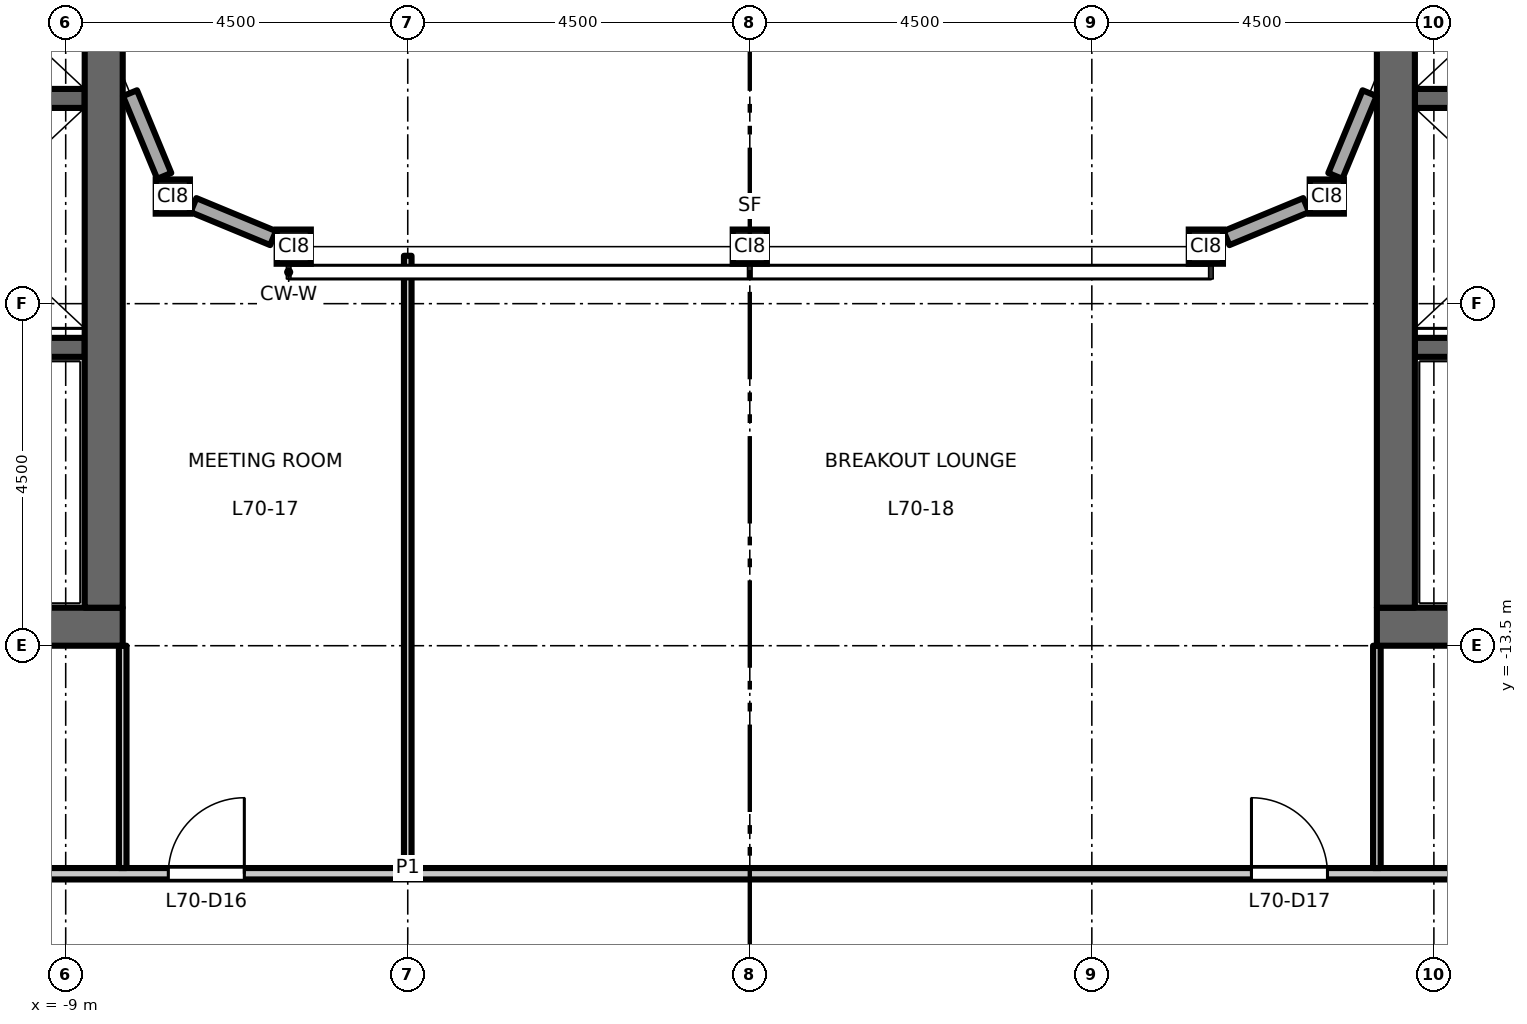
"""IFC4 building model, lengths in metres.
Left out: names, types, materials, properties, quantities, classifications, styles, units other than length and angle.
Written with IfcOpenShell. Run it as: python <this file> out.ifc"""

import sys

from ifc_helpers import new_model, si_unit, direction, frame, frame_2d, origin, origin_2d, place, context, subcontext, project, spatial, rectangle, hollow_rectangle, extrude, element, fill, save


model = new_model("IFC4")
c1 = context("Model", 3, precision=1e-05, world=origin(), true_north=direction((0.0, 1.0)))
c2 = subcontext(c1, "Body", "Model", "MODEL_VIEW")
j1 = project(units=[si_unit("LENGTHUNIT", "METRE"), si_unit("PLANEANGLEUNIT", "RADIAN")], contexts=[c1])
p1 = place(None, origin())
s1 = spatial("IfcSite", under=j1, at=p1, CompositionType="ELEMENT")
p2 = place(p1, origin())
s2 = spatial("IfcBuilding", under=s1, at=p2, CompositionType="ELEMENT")
p3 = place(p2, frame((0.0, 0.0, 325.7)))
s3 = spatial("IfcBuildingStorey", under=s2, at=p3, CompositionType="ELEMENT", Elevation=325.7)
for number, where, z_axis, x_axis in (
    (1, (-7.591, -7.591, 0.0), (0.0, 0.0, 1.0), (1.0, 0.0, 0.0)),
    (2, (-6.0, -8.25, 0.0), (0.0, 0.0, 1.0), (1.0, 0.0, 0.0)),
    (3, (0.0, -8.25, 0.0), (0.0, 0.0, 1.0), (1.0, 0.0, 0.0)),
    (4, (6.0, -8.25, 0.0), (0.0, 0.0, 1.0), (1.0, 0.0, 0.0)),
    (5, (7.591, -7.591, 0.0), (0.0, 0.0, 1.0), (1.0, 0.0, 0.0)),
):
    element("IfcColumn", number, at=place(p3, frame(where, z_axis=z_axis, x_axis=x_axis)), inside=s3, PredefinedType="COLUMN", context=c2, shape_type="SweptSolid", body=[
        extrude(hollow_rectangle(XDim=0.45, YDim=0.45, WallThickness=0.022, at=origin_2d()), origin(), (0.0, 0.0, 1.0), 4.5),
    ])
p4 = place(p3, frame((-8.75, -6.3, 0.0), z_axis=(0.0, 0.0, 1.0), x_axis=(-1.0, 0.0, 0.0)))
e6 = element("IfcWall", 6, at=p4, inside=s3, PredefinedType="SHEAR", context=c2, shape_type="SweptSolid", body=[
    extrude(rectangle(XDim=3.1, YDim=0.25, at=frame_2d((1.55, 0.0))), origin(), (0.0, 0.0, 1.0), 4.35),
])
p5 = place(p3, frame((-8.75, -9.575, 0.0), z_axis=(0.0, 0.0, 1.0), x_axis=(-1.0, 0.0, 0.0)))
e7 = element("IfcWall", 7, at=p5, inside=s3, PredefinedType="SHEAR", context=c2, shape_type="SweptSolid", body=[
    extrude(rectangle(XDim=8.0, YDim=0.25, at=frame_2d((4.0, 0.0))), origin(), (0.0, 0.0, 1.0), 4.35),
])
p6 = place(p5, frame((6.65, 0.0, 0.0)))
e8 = element("IfcOpeningElement", 8, at=p6, cuts=e7, PredefinedType="OPENING", context=c2, shape_type="SweptSolid", body=[
    extrude(rectangle(XDim=1.1, YDim=2.1, at=frame_2d((0.55, 1.05))), frame((0.0, 0.135, 0.0), z_axis=(0.0, -1.0, 0.0), x_axis=(1.0, 0.0, 0.0)), (0.0, 0.0, 1.0), 0.27),
])
p7 = place(p3, frame((-8.25, -13.25, 0.0), z_axis=(0.0, 0.0, 1.0), x_axis=(-1.0, 0.0, 0.0)))
e9 = element("IfcWall", 9, at=p7, inside=s3, PredefinedType="SHEAR", context=c2, shape_type="SweptSolid", body=[
    extrude(rectangle(XDim=9.0, YDim=0.5, at=frame_2d((4.5, 0.0))), origin(), (0.0, 0.0, 1.0), 4.35),
])
p8 = place(p3, frame((-8.5, -13.0, 0.0), z_axis=(0.0, 0.0, 1.0), x_axis=(0.0, 1.0, 0.0)))
e10 = element("IfcWall", 10, at=p8, inside=s3, PredefinedType="SHEAR", context=c2, shape_type="SweptSolid", body=[
    extrude(rectangle(XDim=26.0, YDim=0.5, at=frame_2d((13.0, 0.0))), origin(), (0.0, 0.0, 1.0), 4.35),
])
p9 = place(p3, frame((8.75, -6.3, 0.0), z_axis=(0.0, 0.0, 1.0), x_axis=(1.0, 0.0, 0.0)))
e11 = element("IfcWall", 11, at=p9, inside=s3, PredefinedType="SHEAR", context=c2, shape_type="SweptSolid", body=[
    extrude(rectangle(XDim=3.1, YDim=0.25, at=frame_2d((1.55, 0.0))), origin(), (0.0, 0.0, 1.0), 4.35),
])
p10 = place(p3, frame((8.75, -9.575, 0.0), z_axis=(0.0, 0.0, 1.0), x_axis=(1.0, 0.0, 0.0)))
e12 = element("IfcWall", 12, at=p10, inside=s3, PredefinedType="SHEAR", context=c2, shape_type="SweptSolid", body=[
    extrude(rectangle(XDim=8.0, YDim=0.25, at=frame_2d((4.0, 0.0))), origin(), (0.0, 0.0, 1.0), 4.35),
])
p11 = place(p10, frame((6.65, 0.0, 0.0)))
e13 = element("IfcOpeningElement", 13, at=p11, cuts=e12, PredefinedType="OPENING", context=c2, shape_type="SweptSolid", body=[
    extrude(rectangle(XDim=1.1, YDim=2.1, at=frame_2d((0.55, 1.05))), frame((0.0, 0.135, 0.0), z_axis=(0.0, -1.0, 0.0), x_axis=(1.0, 0.0, 0.0)), (0.0, 0.0, 1.0), 0.27),
])
p12 = place(p3, frame((8.25, -13.25, 0.0), z_axis=(0.0, 0.0, 1.0), x_axis=(1.0, 0.0, 0.0)))
e14 = element("IfcWall", 14, at=p12, inside=s3, PredefinedType="SHEAR", context=c2, shape_type="SweptSolid", body=[
    extrude(rectangle(XDim=9.0, YDim=0.5, at=frame_2d((4.5, 0.0))), origin(), (0.0, 0.0, 1.0), 4.35),
])
p13 = place(p3, frame((8.5, -13.0, 0.0), z_axis=(0.0, 0.0, 1.0), x_axis=(0.0, 1.0, 0.0)))
e15 = element("IfcWall", 15, at=p13, inside=s3, PredefinedType="SHEAR", context=c2, shape_type="SweptSolid", body=[
    extrude(rectangle(XDim=26.0, YDim=0.5, at=frame_2d((13.0, 0.0))), origin(), (0.0, 0.0, 1.0), 4.35),
])
p14 = place(p3, frame((6.271, -8.137, 0.0), z_axis=(0.0, 0.0, 1.0), x_axis=(0.923864661962, 0.382719331074, 0.0)))
e16 = element("IfcWall", 16, at=p14, inside=s3, PredefinedType="STANDARD", context=c2, shape_type="SweptSolid", body=[
    extrude(rectangle(XDim=1.134, YDim=0.2, at=frame_2d((0.567, 0.0))), origin(), (0.0, 0.0, 1.0), 4.01),
])
for number, where, z_axis, x_axis in (
    (17, (7.703, -7.319, 0.0), (0.0, 0.0, 1.0), (0.383, 0.924, 0.0)),
    (18, (-8.154, -6.231, 0.0), (0.0, 0.0, 1.0), (0.383, -0.924, 0.0)),
):
    element("IfcWall", number, at=place(p3, frame(where, z_axis=z_axis, x_axis=x_axis)), inside=s3, PredefinedType="STANDARD", context=c2, shape_type="SweptSolid", body=[
        extrude(rectangle(XDim=1.178, YDim=0.2, at=frame_2d((0.589, 0.0))), origin(), (0.0, 0.0, 1.0), 4.01),
    ])
p15 = place(p3, frame((-7.319, -7.703, 0.0), z_axis=(0.0, 0.0, 1.0), x_axis=(0.923864661962, -0.382719331074, 0.0)))
e19 = element("IfcWall", 19, at=p15, inside=s3, PredefinedType="STANDARD", context=c2, shape_type="SweptSolid", body=[
    extrude(rectangle(XDim=1.134, YDim=0.2, at=frame_2d((0.567, 0.0))), origin(), (0.0, 0.0, 1.0), 4.01),
])
p16 = place(p3, frame((-17.325, -16.5, 0.0), z_axis=(0.0, 0.0, 1.0), x_axis=(1.0, 0.0, 0.0)))
e20 = element("IfcWall", 20, at=p16, inside=s3, PredefinedType="PARTITIONING", context=c2, shape_type="SweptSolid", body=[
    extrude(rectangle(XDim=34.65, YDim=0.15, at=frame_2d((17.325, 0.0))), origin(), (0.0, 0.0, 1.0), 4.35),
])
p17 = place(p16, frame((9.675, 0.0, 0.0)))
e21 = element("IfcOpeningElement", 21, at=p17, cuts=e20, PredefinedType="OPENING", context=c2, shape_type="SweptSolid", body=[
    extrude(rectangle(XDim=1.0, YDim=2.1, at=frame_2d((0.5, 1.05))), frame((0.0, 0.085, 0.0), z_axis=(0.0, -1.0, 0.0), x_axis=(1.0, 0.0, 0.0)), (0.0, 0.0, 1.0), 0.17),
])
p18 = place(p16, frame((23.925, 0.0, 0.0)))
e22 = element("IfcOpeningElement", 22, at=p18, cuts=e20, PredefinedType="OPENING", context=c2, shape_type="SweptSolid", body=[
    extrude(rectangle(XDim=1.0, YDim=2.1, at=frame_2d((0.5, 1.05))), frame((0.0, 0.085, 0.0), z_axis=(0.0, -1.0, 0.0), x_axis=(1.0, 0.0, 0.0)), (0.0, 0.0, 1.0), 0.17),
])
p19 = place(p16, frame((0.675, 0.0, 0.0)))
e23 = element("IfcOpeningElement", 23, at=p19, cuts=e20, PredefinedType="OPENING", context=c2, shape_type="SweptSolid", body=[
    extrude(rectangle(XDim=1.0, YDim=2.1, at=frame_2d((0.5, 1.05))), frame((0.0, 0.085, 0.0), z_axis=(0.0, -1.0, 0.0), x_axis=(1.0, 0.0, 0.0)), (0.0, 0.0, 1.0), 0.17),
])
p20 = place(p16, frame((32.925, 0.0, 0.0)))
e24 = element("IfcOpeningElement", 24, at=p20, cuts=e20, PredefinedType="OPENING", context=c2, shape_type="SweptSolid", body=[
    extrude(rectangle(XDim=1.0, YDim=2.1, at=frame_2d((0.5, 1.05))), frame((0.0, 0.085, 0.0), z_axis=(0.0, -1.0, 0.0), x_axis=(1.0, 0.0, 0.0)), (0.0, 0.0, 1.0), 0.17),
])
p21 = place(p3, frame((-8.25, -16.425, 0.0), z_axis=(0.0, 0.0, 1.0), x_axis=(0.0, 1.0, 0.0)))
e25 = element("IfcWall", 25, at=p21, inside=s3, PredefinedType="PARTITIONING", context=c2, shape_type="SweptSolid", body=[
    extrude(rectangle(XDim=2.925, YDim=0.1, at=frame_2d((1.462, 0.0))), origin(), (0.0, 0.0, 1.0), 4.35),
])
p22 = place(p3, frame((-4.5, -16.425, 0.0), z_axis=(0.0, 0.0, 1.0), x_axis=(0.0, 1.0, 0.0)))
e26 = element("IfcWall", 26, at=p22, inside=s3, PredefinedType="PARTITIONING", context=c2, shape_type="SweptSolid", body=[
    extrude(rectangle(XDim=8.055, YDim=0.1, at=frame_2d((4.027, 0.0))), origin(), (0.0, 0.0, 1.0), 3.65),
])
p23 = place(p3, frame((8.25, -16.425, 0.0), z_axis=(0.0, 0.0, 1.0), x_axis=(0.0, 1.0, 0.0)))
e27 = element("IfcWall", 27, at=p23, inside=s3, PredefinedType="PARTITIONING", context=c2, shape_type="SweptSolid", body=[
    extrude(rectangle(XDim=2.925, YDim=0.1, at=frame_2d((1.462, 0.0))), origin(), (0.0, 0.0, 1.0), 4.35),
])
p24 = place(p17, origin())
e28 = element("IfcDoor", 28, at=p24, inside=s3, OperationType="SINGLE_SWING_RIGHT", PredefinedType="DOOR", context=c2, shape_type="SweptSolid", body=[
    extrude(rectangle(XDim=1.0, YDim=2.1, at=frame_2d((0.5, 1.05))), frame((0.0, 0.025, 0.0), z_axis=(0.0, -1.0, 0.0), x_axis=(1.0, 0.0, 0.0)), (0.0, 0.0, 1.0), 0.05),
])
fill(e21, e28)
p25 = place(p18, origin())
e29 = element("IfcDoor", 29, at=p25, inside=s3, OperationType="SINGLE_SWING_LEFT", PredefinedType="DOOR", context=c2, shape_type="SweptSolid", body=[
    extrude(rectangle(XDim=1.0, YDim=2.1, at=frame_2d((0.5, 1.05))), frame((0.0, 0.025, 0.0), z_axis=(0.0, -1.0, 0.0), x_axis=(1.0, 0.0, 0.0)), (0.0, 0.0, 1.0), 0.05),
])
fill(e22, e29)
save(model, sys.argv[1])
